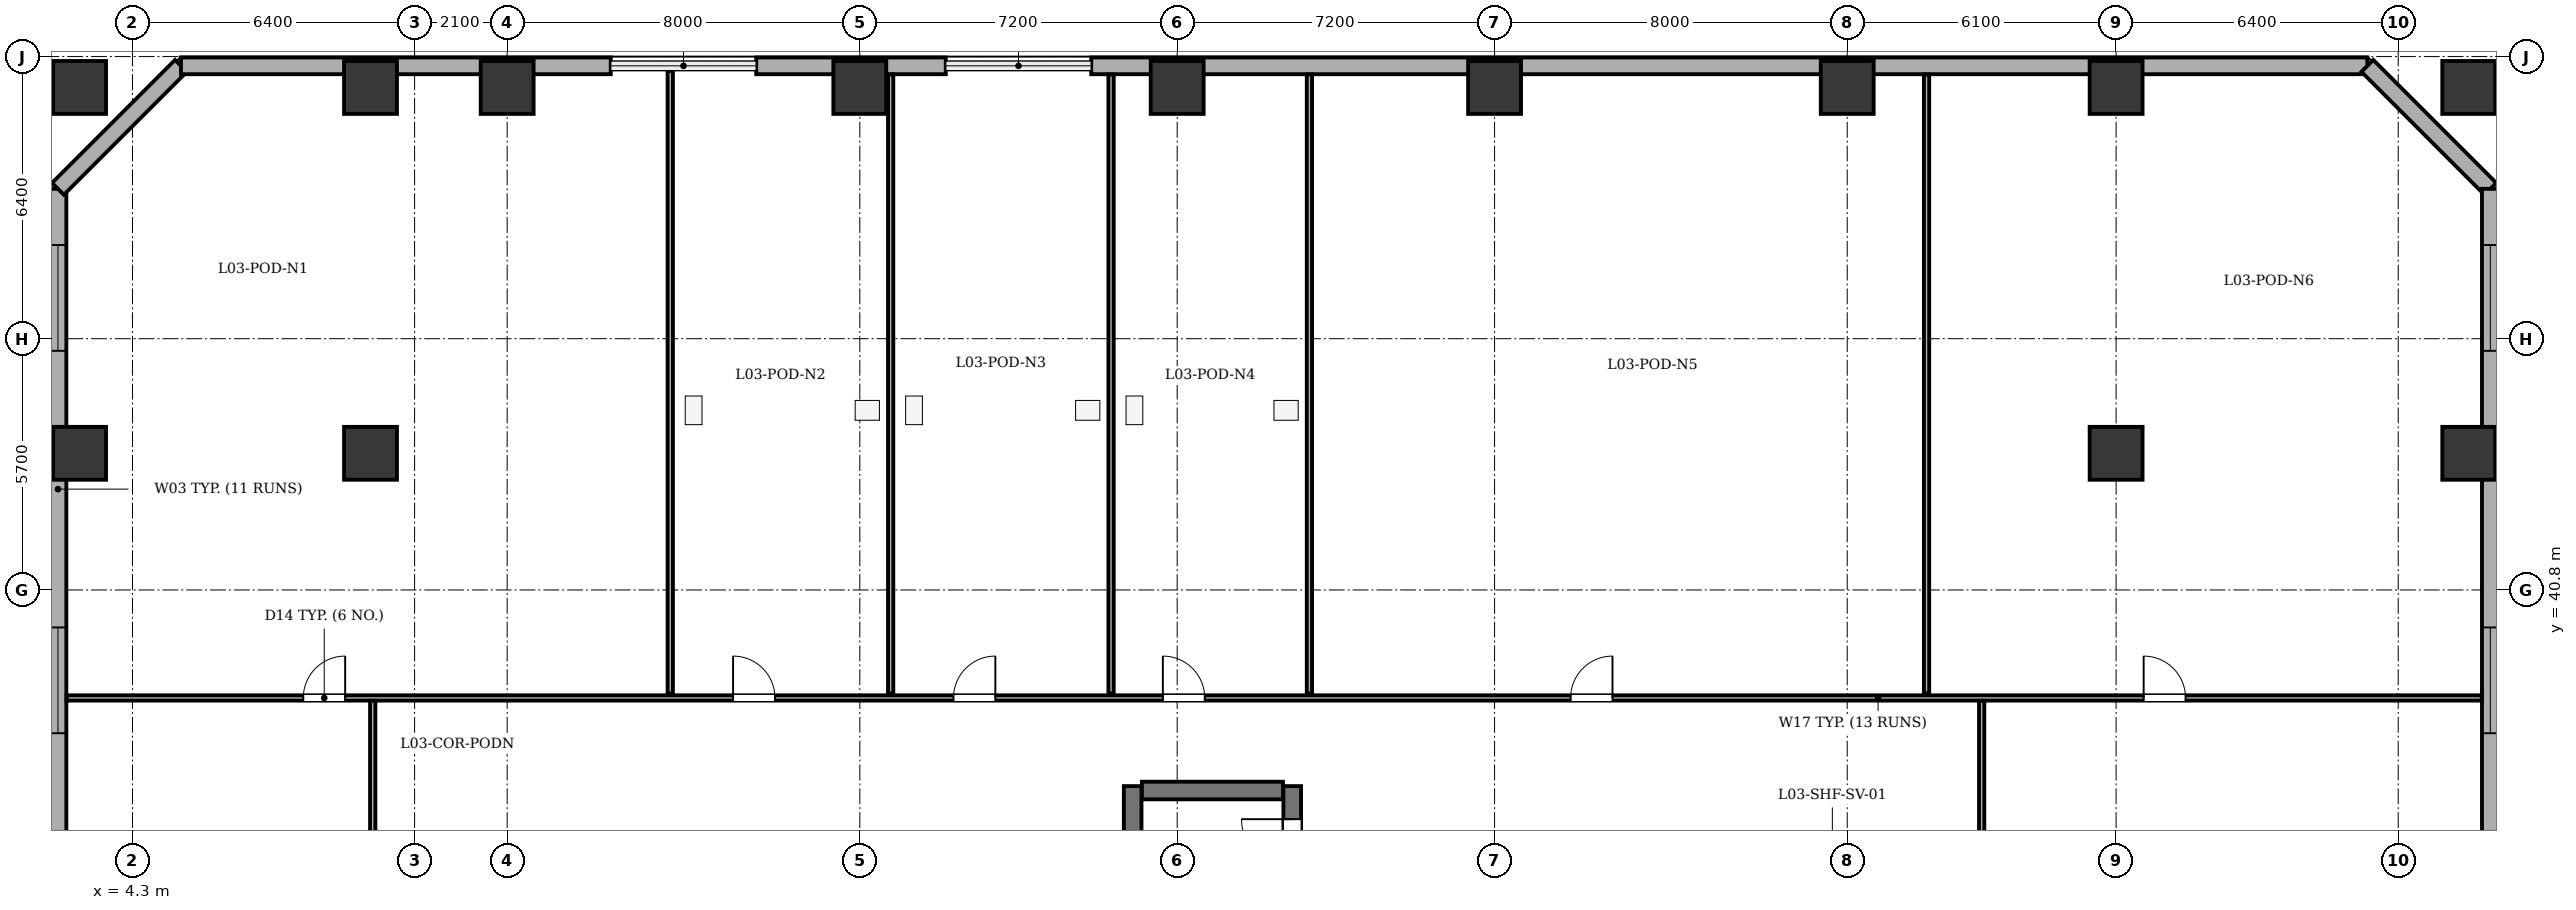
"""IFC4 building model, lengths in metres.
Left out: names, types, materials, properties, quantities, classifications, styles, units other than length and angle.
Written with IfcOpenShell. Run it as: python <this file> out.ifc"""

import sys

from ifc_helpers import new_model, si_unit, direction, frame, frame_2d, origin, origin_2d, place, context, subcontext, project, spatial, rectangle, extrude, element, fill, save


model = new_model("IFC4")
c1 = context("Model", 3, precision=1e-05, world=origin(), true_north=direction((0.0, 1.0)))
c2 = subcontext(c1, "Body", "Model", "MODEL_VIEW")
j1 = project(units=[si_unit("LENGTHUNIT", "METRE"), si_unit("PLANEANGLEUNIT", "RADIAN")], contexts=[c1])
p1 = place(None, origin())
s1 = spatial("IfcSite", under=j1, at=p1, CompositionType="ELEMENT")
p2 = place(p1, origin())
s2 = spatial("IfcBuilding", under=s1, at=p2, CompositionType="ELEMENT")
p3 = place(p2, frame((0.0, 0.0, 14.4)))
s3 = spatial("IfcBuildingStorey", under=s2, at=p3, CompositionType="ELEMENT", Elevation=14.4)
for number, where, z_axis, x_axis in (
    (1, (3.1, 52.2, 0.0), (0.0, 0.0, 1.0), (1.0, 0.0, 0.0)),
    (2, (9.7, 52.2, 0.0), (0.0, 0.0, 1.0), (1.0, 0.0, 0.0)),
    (3, (12.8, 52.2, 0.0), (0.0, 0.0, 1.0), (1.0, 0.0, 0.0)),
    (4, (20.8, 52.2, 0.0), (0.0, 0.0, 1.0), (1.0, 0.0, 0.0)),
    (5, (28.0, 52.2, 0.0), (0.0, 0.0, 1.0), (1.0, 0.0, 0.0)),
    (6, (35.2, 52.2, 0.0), (0.0, 0.0, 1.0), (1.0, 0.0, 0.0)),
    (7, (43.2, 52.2, 0.0), (0.0, 0.0, 1.0), (1.0, 0.0, 0.0)),
    (8, (49.3, 52.2, 0.0), (0.0, 0.0, 1.0), (1.0, 0.0, 0.0)),
    (9, (57.3, 52.2, 0.0), (0.0, 0.0, 1.0), (1.0, 0.0, 0.0)),
    (10, (3.1, 43.9, 0.0), (0.0, 0.0, 1.0), (1.0, 0.0, 0.0)),
    (11, (57.3, 43.9, 0.0), (0.0, 0.0, 1.0), (1.0, 0.0, 0.0)),
    (12, (9.7, 43.9, 0.0), (0.0, 0.0, 1.0), (1.0, 0.0, 0.0)),
    (13, (49.3, 43.9, 0.0), (0.0, 0.0, 1.0), (1.0, 0.0, 0.0)),
):
    element("IfcColumn", number, at=place(p3, frame(where, z_axis=z_axis, x_axis=x_axis)), inside=s3, PredefinedType="COLUMN", context=c2, shape_type="SweptSolid", body=[
        extrude(rectangle(XDim=1.2, YDim=1.2, at=origin_2d()), origin(), (0.0, 0.0, 1.0), 4.5),
    ])
p4 = place(p3, frame((2.61, 4.5, 0.0), z_axis=(0.0, 0.0, 1.0), x_axis=(0.0, 1.0, 0.0)))
e14 = element("IfcWall", 14, at=p4, inside=s3, PredefinedType="STANDARD", context=c2, shape_type="SweptSolid", body=[
    extrude(rectangle(XDim=45.4, YDim=0.38, at=frame_2d((22.7, 0.0))), origin(), (0.0, 0.0, 1.0), 4.0),
])
p5 = place(p4, frame((1.275, 0.0, 0.75)))
e15 = element("IfcOpeningElement", 15, at=p5, cuts=e14, PredefinedType="OPENING", context=c2, shape_type="SweptSolid", body=[
    extrude(rectangle(XDim=2.4, YDim=2.1, at=frame_2d((1.2, 1.05))), frame((0.0, 0.2, 0.0), z_axis=(0.0, -1.0, 0.0), x_axis=(1.0, 0.0, 0.0)), (0.0, 0.0, 1.0), 0.4),
])
p6 = place(p4, frame((9.95, 0.0, 0.75)))
e16 = element("IfcOpeningElement", 16, at=p6, cuts=e14, PredefinedType="OPENING", context=c2, shape_type="SweptSolid", body=[
    extrude(rectangle(XDim=2.4, YDim=2.1, at=frame_2d((1.2, 1.05))), frame((0.0, 0.2, 0.0), z_axis=(0.0, -1.0, 0.0), x_axis=(1.0, 0.0, 0.0)), (0.0, 0.0, 1.0), 0.4),
])
p7 = place(p4, frame((18.3, 0.0, 0.75)))
e17 = element("IfcOpeningElement", 17, at=p7, cuts=e14, PredefinedType="OPENING", context=c2, shape_type="SweptSolid", body=[
    extrude(rectangle(XDim=2.4, YDim=2.1, at=frame_2d((1.2, 1.05))), frame((0.0, 0.2, 0.0), z_axis=(0.0, -1.0, 0.0), x_axis=(1.0, 0.0, 0.0)), (0.0, 0.0, 1.0), 0.4),
])
p8 = place(p4, frame((24.7, 0.0, 0.75)))
e18 = element("IfcOpeningElement", 18, at=p8, cuts=e14, PredefinedType="OPENING", context=c2, shape_type="SweptSolid", body=[
    extrude(rectangle(XDim=2.4, YDim=2.1, at=frame_2d((1.2, 1.05))), frame((0.0, 0.2, 0.0), z_axis=(0.0, -1.0, 0.0), x_axis=(1.0, 0.0, 0.0)), (0.0, 0.0, 1.0), 0.4),
])
p9 = place(p4, frame((33.05, 0.0, 0.75)))
e19 = element("IfcOpeningElement", 19, at=p9, cuts=e14, PredefinedType="OPENING", context=c2, shape_type="SweptSolid", body=[
    extrude(rectangle(XDim=2.4, YDim=2.1, at=frame_2d((1.2, 1.05))), frame((0.0, 0.2, 0.0), z_axis=(0.0, -1.0, 0.0), x_axis=(1.0, 0.0, 0.0)), (0.0, 0.0, 1.0), 0.4),
])
p10 = place(p4, frame((41.725, 0.0, 0.75)))
e20 = element("IfcOpeningElement", 20, at=p10, cuts=e14, PredefinedType="OPENING", context=c2, shape_type="SweptSolid", body=[
    extrude(rectangle(XDim=2.4, YDim=2.1, at=frame_2d((1.2, 1.05))), frame((0.0, 0.2, 0.0), z_axis=(0.0, -1.0, 0.0), x_axis=(1.0, 0.0, 0.0)), (0.0, 0.0, 1.0), 0.4),
])
p11 = place(p3, frame((2.61, 49.9, 0.0), z_axis=(0.0, 0.0, 1.0), x_axis=(0.707075841688, 0.707137719332, 0.0)))
e21 = element("IfcWall", 21, at=p11, inside=s3, PredefinedType="STANDARD", context=c2, shape_type="SweptSolid", body=[
    extrude(rectangle(XDim=3.946, YDim=0.38, at=frame_2d((1.973, 0.0))), origin(), (0.0, 0.0, 1.0), 4.0),
])
p12 = place(p3, frame((5.4, 52.69, 0.0), z_axis=(0.0, 0.0, 1.0), x_axis=(1.0, 0.0, 0.0)))
e22 = element("IfcWall", 22, at=p12, inside=s3, PredefinedType="STANDARD", context=c2, shape_type="SweptSolid", body=[
    extrude(rectangle(XDim=9.75, YDim=0.38, at=frame_2d((4.875, 0.0))), origin(), (0.0, 0.0, 1.0), 4.0),
])
p13 = place(p3, frame((18.45, 52.69, 0.0), z_axis=(0.0, 0.0, 1.0), x_axis=(1.0, 0.0, 0.0)))
e23 = element("IfcWall", 23, at=p13, inside=s3, PredefinedType="STANDARD", context=c2, shape_type="SweptSolid", body=[
    extrude(rectangle(XDim=4.3, YDim=0.38, at=frame_2d((2.15, 0.0))), origin(), (0.0, 0.0, 1.0), 4.0),
])
p14 = place(p3, frame((26.05, 52.69, 0.0), z_axis=(0.0, 0.0, 1.0), x_axis=(1.0, 0.0, 0.0)))
e24 = element("IfcWall", 24, at=p14, inside=s3, PredefinedType="STANDARD", context=c2, shape_type="SweptSolid", body=[
    extrude(rectangle(XDim=28.95, YDim=0.38, at=frame_2d((14.475, 0.0))), origin(), (0.0, 0.0, 1.0), 4.0),
])
p15 = place(p3, frame((55.0, 52.69, 0.0), z_axis=(0.0, 0.0, 1.0), x_axis=(0.707106781187, -0.707106781187, 0.0)))
e25 = element("IfcWall", 25, at=p15, inside=s3, PredefinedType="STANDARD", context=c2, shape_type="SweptSolid", body=[
    extrude(rectangle(XDim=3.946, YDim=0.38, at=frame_2d((1.973, 0.0))), origin(), (0.0, 0.0, 1.0), 4.0),
])
p16 = place(p3, frame((57.79, 49.9, 0.0), z_axis=(0.0, 0.0, 1.0), x_axis=(0.0, -1.0, 0.0)))
e26 = element("IfcWall", 26, at=p16, inside=s3, PredefinedType="STANDARD", context=c2, shape_type="SweptSolid", body=[
    extrude(rectangle(XDim=45.4, YDim=0.38, at=frame_2d((22.7, 0.0))), origin(), (0.0, 0.0, 1.0), 4.0),
])
p17 = place(p16, frame((1.275, 0.0, 0.75)))
e27 = element("IfcOpeningElement", 27, at=p17, cuts=e26, PredefinedType="OPENING", context=c2, shape_type="SweptSolid", body=[
    extrude(rectangle(XDim=2.4, YDim=2.1, at=frame_2d((1.2, 1.05))), frame((0.0, 0.2, 0.0), z_axis=(0.0, -1.0, 0.0), x_axis=(1.0, 0.0, 0.0)), (0.0, 0.0, 1.0), 0.4),
])
p18 = place(p16, frame((9.95, 0.0, 0.75)))
e28 = element("IfcOpeningElement", 28, at=p18, cuts=e26, PredefinedType="OPENING", context=c2, shape_type="SweptSolid", body=[
    extrude(rectangle(XDim=2.4, YDim=2.1, at=frame_2d((1.2, 1.05))), frame((0.0, 0.2, 0.0), z_axis=(0.0, -1.0, 0.0), x_axis=(1.0, 0.0, 0.0)), (0.0, 0.0, 1.0), 0.4),
])
p19 = place(p16, frame((18.3, 0.0, 0.75)))
e29 = element("IfcOpeningElement", 29, at=p19, cuts=e26, PredefinedType="OPENING", context=c2, shape_type="SweptSolid", body=[
    extrude(rectangle(XDim=2.4, YDim=2.1, at=frame_2d((1.2, 1.05))), frame((0.0, 0.2, 0.0), z_axis=(0.0, -1.0, 0.0), x_axis=(1.0, 0.0, 0.0)), (0.0, 0.0, 1.0), 0.4),
])
p20 = place(p16, frame((24.7, 0.0, 0.75)))
e30 = element("IfcOpeningElement", 30, at=p20, cuts=e26, PredefinedType="OPENING", context=c2, shape_type="SweptSolid", body=[
    extrude(rectangle(XDim=2.4, YDim=2.1, at=frame_2d((1.2, 1.05))), frame((0.0, 0.2, 0.0), z_axis=(0.0, -1.0, 0.0), x_axis=(1.0, 0.0, 0.0)), (0.0, 0.0, 1.0), 0.4),
])
p21 = place(p16, frame((33.05, 0.0, 0.75)))
e31 = element("IfcOpeningElement", 31, at=p21, cuts=e26, PredefinedType="OPENING", context=c2, shape_type="SweptSolid", body=[
    extrude(rectangle(XDim=2.4, YDim=2.1, at=frame_2d((1.2, 1.05))), frame((0.0, 0.2, 0.0), z_axis=(0.0, -1.0, 0.0), x_axis=(1.0, 0.0, 0.0)), (0.0, 0.0, 1.0), 0.4),
])
p22 = place(p16, frame((41.725, 0.0, 0.75)))
e32 = element("IfcOpeningElement", 32, at=p22, cuts=e26, PredefinedType="OPENING", context=c2, shape_type="SweptSolid", body=[
    extrude(rectangle(XDim=2.4, YDim=2.1, at=frame_2d((1.2, 1.05))), frame((0.0, 0.2, 0.0), z_axis=(0.0, -1.0, 0.0), x_axis=(1.0, 0.0, 0.0)), (0.0, 0.0, 1.0), 0.4),
])
p23 = place(p3, frame((26.99, 28.75, 0.0), z_axis=(0.0, 0.0, 1.0), x_axis=(0.0, 1.0, 0.0)))
e33 = element("IfcWall", 33, at=p23, inside=s3, PredefinedType="SHEAR", context=c2, shape_type="SweptSolid", body=[
    extrude(rectangle(XDim=7.6, YDim=0.4, at=frame_2d((3.8, 0.0))), origin(), (0.0, 0.0, 1.0), 4.0),
])
p24 = place(p3, frame((30.61, 28.75, 0.0), z_axis=(0.0, 0.0, 1.0), x_axis=(0.0, 1.0, 0.0)))
e34 = element("IfcWall", 34, at=p24, inside=s3, PredefinedType="SHEAR", context=c2, shape_type="SweptSolid", body=[
    extrude(rectangle(XDim=7.6, YDim=0.4, at=frame_2d((3.8, 0.0))), origin(), (0.0, 0.0, 1.0), 4.0),
])
p25 = place(p24, frame((5.7, 0.0, 0.0)))
e35 = element("IfcOpeningElement", 35, at=p25, cuts=e34, PredefinedType="OPENING", context=c2, shape_type="SweptSolid", body=[
    extrude(rectangle(XDim=1.15, YDim=2.15, at=frame_2d((0.575, 1.075))), frame((0.0, 0.21, 0.0), z_axis=(0.0, -1.0, 0.0), x_axis=(1.0, 0.0, 0.0)), (0.0, 0.0, 1.0), 0.42),
])
p26 = place(p3, frame((27.2, 36.25, 0.0), z_axis=(0.0, 0.0, 1.0), x_axis=(1.0, 0.0, 0.0)))
e36 = element("IfcWall", 36, at=p26, inside=s3, PredefinedType="SHEAR", context=c2, shape_type="SweptSolid", body=[
    extrude(rectangle(XDim=3.2, YDim=0.4, at=frame_2d((1.6, 0.0))), origin(), (0.0, 0.0, 1.0), 4.0),
])
p27 = place(p3, frame((2.805, 38.35, 0.0), z_axis=(0.0, 0.0, 1.0), x_axis=(1.0, 0.0, 0.0)))
e37 = element("IfcWall", 37, at=p27, inside=s3, PredefinedType="PARTITIONING", context=c2, shape_type="SweptSolid", body=[
    extrude(rectangle(XDim=54.79, YDim=0.12, at=frame_2d((27.395, 0.0))), origin(), (0.0, 0.0, 1.0), 4.0),
])
p28 = place(p27, frame((5.37, 0.0, 0.0)))
e38 = element("IfcOpeningElement", 38, at=p28, cuts=e37, PredefinedType="OPENING", context=c2, shape_type="SweptSolid", body=[
    extrude(rectangle(XDim=0.95, YDim=2.1, at=frame_2d((0.475, 1.05))), frame((0.0, 0.07, 0.0), z_axis=(0.0, -1.0, 0.0), x_axis=(1.0, 0.0, 0.0)), (0.0, 0.0, 1.0), 0.14),
])
p29 = place(p27, frame((15.12, 0.0, 0.0)))
e39 = element("IfcOpeningElement", 39, at=p29, cuts=e37, PredefinedType="OPENING", context=c2, shape_type="SweptSolid", body=[
    extrude(rectangle(XDim=0.95, YDim=2.1, at=frame_2d((0.475, 1.05))), frame((0.0, 0.07, 0.0), z_axis=(0.0, -1.0, 0.0), x_axis=(1.0, 0.0, 0.0)), (0.0, 0.0, 1.0), 0.14),
])
p30 = place(p27, frame((20.12, 0.0, 0.0)))
e40 = element("IfcOpeningElement", 40, at=p30, cuts=e37, PredefinedType="OPENING", context=c2, shape_type="SweptSolid", body=[
    extrude(rectangle(XDim=0.95, YDim=2.1, at=frame_2d((0.475, 1.05))), frame((0.0, 0.07, 0.0), z_axis=(0.0, -1.0, 0.0), x_axis=(1.0, 0.0, 0.0)), (0.0, 0.0, 1.0), 0.14),
])
p31 = place(p27, frame((24.87, 0.0, 0.0)))
e41 = element("IfcOpeningElement", 41, at=p31, cuts=e37, PredefinedType="OPENING", context=c2, shape_type="SweptSolid", body=[
    extrude(rectangle(XDim=0.95, YDim=2.1, at=frame_2d((0.475, 1.05))), frame((0.0, 0.07, 0.0), z_axis=(0.0, -1.0, 0.0), x_axis=(1.0, 0.0, 0.0)), (0.0, 0.0, 1.0), 0.14),
])
p32 = place(p27, frame((34.12, 0.0, 0.0)))
e42 = element("IfcOpeningElement", 42, at=p32, cuts=e37, PredefinedType="OPENING", context=c2, shape_type="SweptSolid", body=[
    extrude(rectangle(XDim=0.95, YDim=2.1, at=frame_2d((0.475, 1.05))), frame((0.0, 0.07, 0.0), z_axis=(0.0, -1.0, 0.0), x_axis=(1.0, 0.0, 0.0)), (0.0, 0.0, 1.0), 0.14),
])
p33 = place(p27, frame((47.12, 0.0, 0.0)))
e43 = element("IfcOpeningElement", 43, at=p33, cuts=e37, PredefinedType="OPENING", context=c2, shape_type="SweptSolid", body=[
    extrude(rectangle(XDim=0.95, YDim=2.1, at=frame_2d((0.475, 1.05))), frame((0.0, 0.07, 0.0), z_axis=(0.0, -1.0, 0.0), x_axis=(1.0, 0.0, 0.0)), (0.0, 0.0, 1.0), 0.14),
])
p34 = place(p3, frame((16.5, 38.45, 0.0), z_axis=(0.0, 0.0, 1.0), x_axis=(0.0, 1.0, 0.0)))
e44 = element("IfcWall", 44, at=p34, inside=s3, PredefinedType="PARTITIONING", context=c2, shape_type="SweptSolid", body=[
    extrude(rectangle(XDim=14.125, YDim=0.12, at=frame_2d((7.062, 0.0))), origin(), (0.0, 0.0, 1.0), 4.0),
])
for number, where, z_axis, x_axis in (
    (45, (21.5, 38.45, 0.0), (0.0, 0.0, 1.0), (0.0, 1.0, 0.0)),
    (46, (26.5, 38.45, 0.0), (0.0, 0.0, 1.0), (0.0, 1.0, 0.0)),
    (47, (31.0, 38.45, 0.0), (0.0, 0.0, 1.0), (0.0, 1.0, 0.0)),
):
    element("IfcWall", number, at=place(p3, frame(where, z_axis=z_axis, x_axis=x_axis)), inside=s3, PredefinedType="PARTITIONING", context=c2, shape_type="SweptSolid", body=[
        extrude(rectangle(XDim=14.045, YDim=0.12, at=frame_2d((7.022, 0.0))), origin(), (0.0, 0.0, 1.0), 4.0),
    ])
p35 = place(p3, frame((45.0, 38.45, 0.0), z_axis=(0.0, 0.0, 1.0), x_axis=(0.0, 1.0, 0.0)))
e48 = element("IfcWall", 48, at=p35, inside=s3, PredefinedType="PARTITIONING", context=c2, shape_type="SweptSolid", body=[
    extrude(rectangle(XDim=14.045, YDim=0.12, at=frame_2d((7.022, 0.0))), origin(), (0.0, 0.0, 1.0), 3.435),
])
p36 = place(p3, frame((9.75, 18.565, 0.0), z_axis=(0.0, 0.0, 1.0), x_axis=(0.0, 1.0, 0.0)))
e49 = element("IfcWall", 49, at=p36, inside=s3, PredefinedType="PARTITIONING", context=c2, shape_type="SweptSolid", body=[
    extrude(rectangle(XDim=19.72, YDim=0.12, at=frame_2d((9.86, 0.0))), origin(), (0.0, 0.0, 1.0), 2.185),
])
p37 = place(p36, frame((7.985, 0.0, 0.0)))
e50 = element("IfcOpeningElement", 50, at=p37, cuts=e49, PredefinedType="OPENING", context=c2, shape_type="SweptSolid", body=[
    extrude(rectangle(XDim=1.0, YDim=2.1, at=frame_2d((0.5, 1.05))), frame((0.0, 0.07, 0.0), z_axis=(0.0, -1.0, 0.0), x_axis=(1.0, 0.0, 0.0)), (0.0, 0.0, 1.0), 0.14),
])
p38 = place(p3, frame((46.25, 18.565, 0.0), z_axis=(0.0, 0.0, 1.0), x_axis=(0.0, 1.0, 0.0)))
e51 = element("IfcWall", 51, at=p38, inside=s3, PredefinedType="PARTITIONING", context=c2, shape_type="SweptSolid", body=[
    extrude(rectangle(XDim=19.72, YDim=0.12, at=frame_2d((9.86, 0.0))), origin(), (0.0, 0.0, 1.0), 4.0),
])
p39 = place(p38, frame((7.985, 0.0, 0.0)))
e52 = element("IfcOpeningElement", 52, at=p39, cuts=e51, PredefinedType="OPENING", context=c2, shape_type="SweptSolid", body=[
    extrude(rectangle(XDim=1.0, YDim=2.1, at=frame_2d((0.5, 1.05))), frame((0.0, 0.07, 0.0), z_axis=(0.0, -1.0, 0.0), x_axis=(1.0, 0.0, 0.0)), (0.0, 0.0, 1.0), 0.14),
])
p40 = place(p9, origin())
e53 = element("IfcWindow", 53, at=p40, inside=s3, PartitioningType="SINGLE_PANEL", PredefinedType="WINDOW", context=c2, shape_type="SweptSolid", body=[
    extrude(rectangle(XDim=2.4, YDim=2.1, at=frame_2d((1.2, 1.05))), frame((0.0, 0.03, 0.0), z_axis=(0.0, -1.0, 0.0), x_axis=(1.0, 0.0, 0.0)), (0.0, 0.0, 1.0), 0.06),
])
fill(e19, e53)
p41 = place(p10, origin())
e54 = element("IfcWindow", 54, at=p41, inside=s3, PartitioningType="SINGLE_PANEL", PredefinedType="WINDOW", context=c2, shape_type="SweptSolid", body=[
    extrude(rectangle(XDim=2.4, YDim=2.1, at=frame_2d((1.2, 1.05))), frame((0.0, 0.03, 0.0), z_axis=(0.0, -1.0, 0.0), x_axis=(1.0, 0.0, 0.0)), (0.0, 0.0, 1.0), 0.06),
])
fill(e20, e54)
p42 = place(p17, origin())
e55 = element("IfcWindow", 55, at=p42, inside=s3, PartitioningType="SINGLE_PANEL", PredefinedType="WINDOW", context=c2, shape_type="SweptSolid", body=[
    extrude(rectangle(XDim=2.4, YDim=2.1, at=frame_2d((1.2, 1.05))), frame((0.0, 0.03, 0.0), z_axis=(0.0, -1.0, 0.0), x_axis=(1.0, 0.0, 0.0)), (0.0, 0.0, 1.0), 0.06),
])
fill(e27, e55)
p43 = place(p18, origin())
e56 = element("IfcWindow", 56, at=p43, inside=s3, PartitioningType="SINGLE_PANEL", PredefinedType="WINDOW", context=c2, shape_type="SweptSolid", body=[
    extrude(rectangle(XDim=2.4, YDim=2.1, at=frame_2d((1.2, 1.05))), frame((0.0, 0.03, 0.0), z_axis=(0.0, -1.0, 0.0), x_axis=(1.0, 0.0, 0.0)), (0.0, 0.0, 1.0), 0.06),
])
fill(e28, e56)
p44 = place(p25, origin())
e57 = element("IfcDoor", 57, at=p44, inside=s3, OperationType="SINGLE_SWING_RIGHT", PredefinedType="DOOR", context=c2, shape_type="SweptSolid", body=[
    extrude(rectangle(XDim=1.15, YDim=2.15, at=frame_2d((0.575, 1.075))), frame((0.0, 0.025, 0.0), z_axis=(0.0, -1.0, 0.0), x_axis=(1.0, 0.0, 0.0)), (0.0, 0.0, 1.0), 0.05),
])
fill(e35, e57)
p45 = place(p28, origin())
e58 = element("IfcDoor", 58, at=p45, inside=s3, OperationType="SINGLE_SWING_RIGHT", PredefinedType="DOOR", context=c2, shape_type="SweptSolid", body=[
    extrude(rectangle(XDim=0.95, YDim=2.1, at=frame_2d((0.475, 1.05))), frame((0.0, 0.025, 0.0), z_axis=(0.0, -1.0, 0.0), x_axis=(1.0, 0.0, 0.0)), (0.0, 0.0, 1.0), 0.05),
])
fill(e38, e58)
p46 = place(p29, origin())
e59 = element("IfcDoor", 59, at=p46, inside=s3, OperationType="SINGLE_SWING_LEFT", PredefinedType="DOOR", context=c2, shape_type="SweptSolid", body=[
    extrude(rectangle(XDim=0.95, YDim=2.1, at=frame_2d((0.475, 1.05))), frame((0.0, 0.025, 0.0), z_axis=(0.0, -1.0, 0.0), x_axis=(1.0, 0.0, 0.0)), (0.0, 0.0, 1.0), 0.05),
])
fill(e39, e59)
p47 = place(p30, origin())
e60 = element("IfcDoor", 60, at=p47, inside=s3, OperationType="SINGLE_SWING_RIGHT", PredefinedType="DOOR", context=c2, shape_type="SweptSolid", body=[
    extrude(rectangle(XDim=0.95, YDim=2.1, at=frame_2d((0.475, 1.05))), frame((0.0, 0.025, 0.0), z_axis=(0.0, -1.0, 0.0), x_axis=(1.0, 0.0, 0.0)), (0.0, 0.0, 1.0), 0.05),
])
fill(e40, e60)
p48 = place(p31, origin())
e61 = element("IfcDoor", 61, at=p48, inside=s3, OperationType="SINGLE_SWING_LEFT", PredefinedType="DOOR", context=c2, shape_type="SweptSolid", body=[
    extrude(rectangle(XDim=0.95, YDim=2.1, at=frame_2d((0.475, 1.05))), frame((0.0, 0.025, 0.0), z_axis=(0.0, -1.0, 0.0), x_axis=(1.0, 0.0, 0.0)), (0.0, 0.0, 1.0), 0.05),
])
fill(e41, e61)
p49 = place(p32, origin())
e62 = element("IfcDoor", 62, at=p49, inside=s3, OperationType="SINGLE_SWING_RIGHT", PredefinedType="DOOR", context=c2, shape_type="SweptSolid", body=[
    extrude(rectangle(XDim=0.95, YDim=2.1, at=frame_2d((0.475, 1.05))), frame((0.0, 0.025, 0.0), z_axis=(0.0, -1.0, 0.0), x_axis=(1.0, 0.0, 0.0)), (0.0, 0.0, 1.0), 0.05),
])
fill(e42, e62)
p50 = place(p33, origin())
e63 = element("IfcDoor", 63, at=p50, inside=s3, OperationType="SINGLE_SWING_LEFT", PredefinedType="DOOR", context=c2, shape_type="SweptSolid", body=[
    extrude(rectangle(XDim=0.95, YDim=2.1, at=frame_2d((0.475, 1.05))), frame((0.0, 0.025, 0.0), z_axis=(0.0, -1.0, 0.0), x_axis=(1.0, 0.0, 0.0)), (0.0, 0.0, 1.0), 0.05),
])
fill(e43, e63)
save(model, sys.argv[1])
